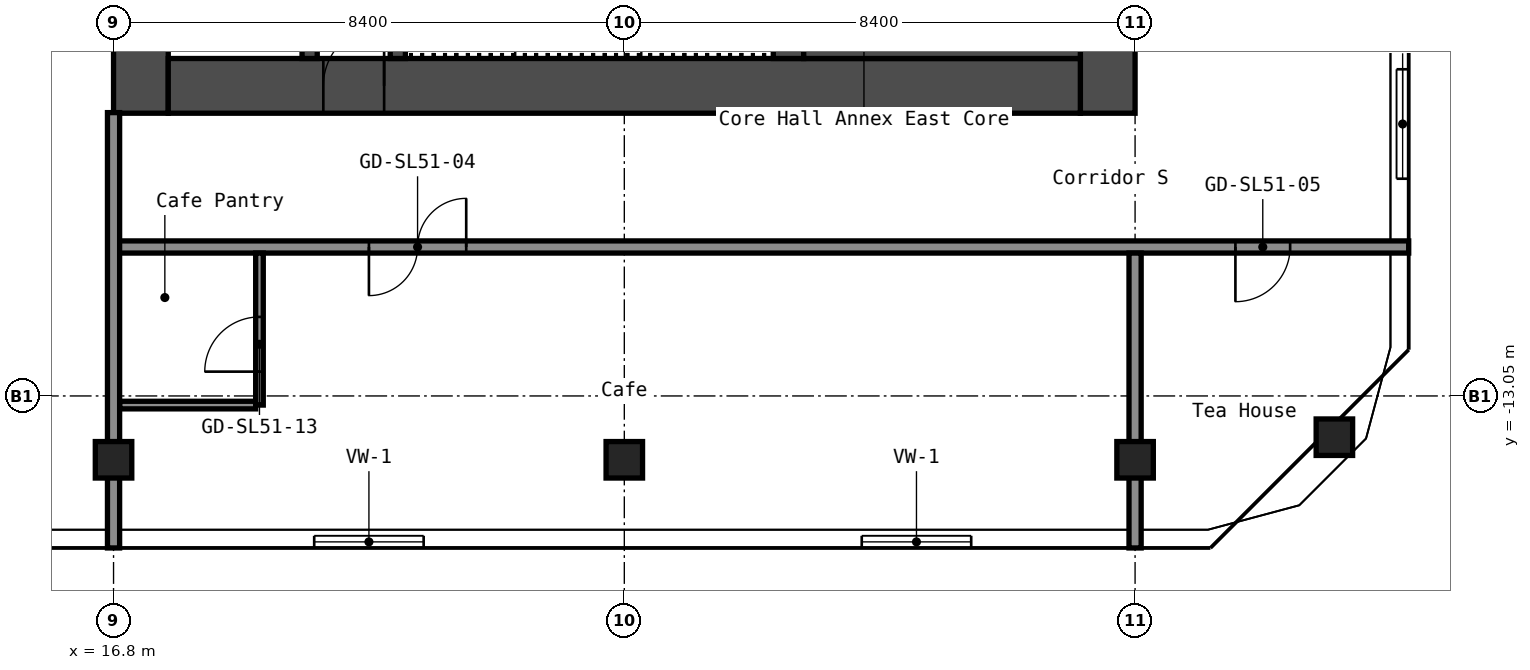
"""IFC4 building model, lengths in metres.
Left out: names, types, materials, properties, quantities, classifications, styles, units other than length and angle.
Written with IfcOpenShell. Run it as: python <this file> out.ifc"""

import sys

from ifc_helpers import new_model, si_unit, direction, frame, frame_2d, origin, origin_2d, place, context, subcontext, project, spatial, rectangle, hollow_rectangle, extrude, element, fill, save


model = new_model("IFC4")
c1 = context("Model", 3, precision=1e-05, world=origin(), true_north=direction((0.0, 1.0)))
c2 = subcontext(c1, "Body", "Model", "MODEL_VIEW")
j1 = project(units=[si_unit("LENGTHUNIT", "METRE"), si_unit("PLANEANGLEUNIT", "RADIAN")], contexts=[c1])
p1 = place(None, origin())
s1 = spatial("IfcSite", under=j1, at=p1, CompositionType="ELEMENT")
p2 = place(p1, origin())
s2 = spatial("IfcBuilding", under=s1, at=p2, CompositionType="ELEMENT")
p3 = place(p2, frame((0.0, 0.0, 180.2)))
s3 = spatial("IfcBuildingStorey", under=s2, at=p3, CompositionType="ELEMENT", Elevation=180.2)
for number, where, z_axis, x_axis in (
    (1, (16.8, -14.1, 0.0), (0.0, 0.0, 1.0), (1.0, 0.0, 0.0)),
    (2, (25.2, -14.1, 0.0), (0.0, 0.0, 1.0), (1.0, 0.0, 0.0)),
    (3, (33.6, -14.1, 0.0), (0.0, 0.0, 1.0), (1.0, 0.0, 0.0)),
    (4, (36.878, -13.729, 0.0), (0.0, 0.0, 1.0), (1.0, 0.0, 0.0)),
):
    element("IfcColumn", number, at=place(p3, frame(where, z_axis=z_axis, x_axis=x_axis)), inside=s3, PredefinedType="COLUMN", context=c2, shape_type="SweptSolid", body=[
        extrude(hollow_rectangle(XDim=0.6, YDim=0.6, WallThickness=0.025, InnerFilletRadius=0.038, OuterFilletRadius=0.062, at=origin_2d()), origin(), (0.0, 0.0, 1.0), 5.95),
    ])
p4 = place(p3, frame((17.25, -8.4, 0.0), z_axis=(0.0, 0.0, 1.0), x_axis=(0.0, 1.0, 0.0)))
e5 = element("IfcWall", 5, at=p4, inside=s3, PredefinedType="SHEAR", context=c2, shape_type="SweptSolid", body=[
    extrude(rectangle(XDim=16.8, YDim=0.9, at=frame_2d((8.4, 0.0))), origin(), (0.0, 0.0, 1.0), 5.95),
])
p5 = place(p4, frame((10.1, 0.0, 0.0)))
e6 = element("IfcOpeningElement", 6, at=p5, cuts=e5, PredefinedType="OPENING", context=c2, shape_type="SweptSolid", body=[
    extrude(rectangle(XDim=1.6, YDim=2.1, at=frame_2d((0.8, 1.05))), frame((0.0, 0.46, 0.0), z_axis=(0.0, -1.0, 0.0), x_axis=(1.0, 0.0, 0.0)), (0.0, 0.0, 1.0), 0.92),
])
p6 = place(p3, frame((33.15, -8.4, 0.0), z_axis=(0.0, 0.0, 1.0), x_axis=(0.0, 1.0, 0.0)))
e7 = element("IfcWall", 7, at=p6, inside=s3, PredefinedType="SHEAR", context=c2, shape_type="SweptSolid", body=[
    extrude(rectangle(XDim=16.8, YDim=0.9, at=frame_2d((8.4, 0.0))), origin(), (0.0, 0.0, 1.0), 5.95),
])
p7 = place(p3, frame((17.7, -7.95, 0.0), z_axis=(0.0, 0.0, 1.0), x_axis=(1.0, 0.0, 0.0)))
e8 = element("IfcWall", 8, at=p7, inside=s3, PredefinedType="SHEAR", context=c2, shape_type="SweptSolid", body=[
    extrude(rectangle(XDim=15.0, YDim=0.9, at=frame_2d((7.5, 0.0))), origin(), (0.0, 0.0, 1.0), 5.95),
])
p8 = place(p7, frame((2.55, 0.0, 0.0)))
e9 = element("IfcOpeningElement", 9, at=p8, cuts=e8, PredefinedType="OPENING", context=c2, shape_type="SweptSolid", body=[
    extrude(rectangle(XDim=1.0, YDim=2.1, at=frame_2d((0.5, 1.05))), frame((0.0, 0.46, 0.0), z_axis=(0.0, -1.0, 0.0), x_axis=(1.0, 0.0, 0.0)), (0.0, 0.0, 1.0), 0.92),
])
p9 = place(p3, frame((20.025, -7.5, 0.0), z_axis=(0.0, 0.0, 1.0), x_axis=(0.0, 1.0, 0.0)))
e10 = element("IfcWall", 10, at=p9, inside=s3, PredefinedType="SHEAR", context=c2, shape_type="SweptSolid", body=[
    extrude(rectangle(XDim=6.3, YDim=0.25, at=frame_2d((3.15, 0.0))), origin(), (0.0, 0.0, 1.0), 5.95),
])
p10 = place(p9, frame((2.4, 0.0, 0.0)))
e11 = element("IfcOpeningElement", 11, at=p10, cuts=e10, PredefinedType="OPENING", context=c2, shape_type="SweptSolid", body=[
    extrude(rectangle(XDim=1.0, YDim=2.1, at=frame_2d((0.5, 1.05))), frame((0.0, 0.135, 0.0), z_axis=(0.0, -1.0, 0.0), x_axis=(1.0, 0.0, 0.0)), (0.0, 0.0, 1.0), 0.27),
])
p11 = place(p3, frame((21.475, -7.5, 0.0), z_axis=(0.0, 0.0, 1.0), x_axis=(0.0, 1.0, 0.0)))
e12 = element("IfcWall", 12, at=p11, inside=s3, PredefinedType="SHEAR", context=c2, shape_type="SweptSolid", body=[
    extrude(rectangle(XDim=3.75, YDim=0.25, at=frame_2d((1.875, 0.0))), origin(), (0.0, 0.0, 1.0), 5.95),
])
p12 = place(p11, frame((1.3, 0.0, 0.0)))
e13 = element("IfcOpeningElement", 13, at=p12, cuts=e12, PredefinedType="OPENING", context=c2, shape_type="SweptSolid", body=[
    extrude(rectangle(XDim=1.2, YDim=2.1, at=frame_2d((0.6, 1.05))), frame((0.0, 0.135, 0.0), z_axis=(0.0, -1.0, 0.0), x_axis=(1.0, 0.0, 0.0)), (0.0, 0.0, 1.0), 0.27),
])
p13 = place(p3, frame((27.9, -7.5, 0.0), z_axis=(0.0, 0.0, 1.0), x_axis=(0.0, 1.0, 0.0)))
e14 = element("IfcWall", 14, at=p13, inside=s3, PredefinedType="SHEAR", context=c2, shape_type="SweptSolid", body=[
    extrude(rectangle(XDim=3.75, YDim=0.5, at=frame_2d((1.875, 0.0))), origin(), (0.0, 0.0, 1.0), 5.95),
])
p14 = place(p3, frame((28.15, -6.75, 0.0), z_axis=(0.0, 0.0, 1.0), x_axis=(1.0, 0.0, 0.0)))
e15 = element("IfcWall", 15, at=p14, inside=s3, PredefinedType="SHEAR", context=c2, shape_type="SweptSolid", body=[
    extrude(rectangle(XDim=4.55, YDim=1.5, at=frame_2d((2.275, 0.0))), origin(), (0.0, 0.0, 1.0), 5.95),
])
p15 = place(p3, frame((16.9, -13.2, 0.0), z_axis=(0.0, 0.0, 1.0), x_axis=(1.0, 0.0, 0.0)))
e16 = element("IfcWall", 16, at=p15, inside=s3, PredefinedType="PARTITIONING", context=c2, shape_type="SweptSolid", body=[
    extrude(rectangle(XDim=2.238, YDim=0.125, at=frame_2d((1.119, 0.0))), origin(), (0.0, 0.0, 1.0), 5.95),
])
p16 = place(p3, frame((16.8, -10.6, 0.0), z_axis=(0.0, 0.0, 1.0), x_axis=(1.0, 0.0, 0.0)))
e17 = element("IfcWall", 17, at=p16, inside=s3, PredefinedType="PARTITIONING", context=c2, shape_type="SweptSolid", body=[
    extrude(rectangle(XDim=21.3, YDim=0.2, at=frame_2d((10.65, 0.0))), origin(), (0.0, 0.0, 1.0), 5.95),
])
p17 = place(p16, frame((4.2, 0.0, 0.0)))
e18 = element("IfcOpeningElement", 18, at=p17, cuts=e17, PredefinedType="OPENING", context=c2, shape_type="SweptSolid", body=[
    extrude(rectangle(XDim=1.6, YDim=2.1, at=frame_2d((0.8, 1.05))), frame((0.0, 0.11, 0.0), z_axis=(0.0, -1.0, 0.0), x_axis=(1.0, 0.0, 0.0)), (0.0, 0.0, 1.0), 0.22),
])
p18 = place(p16, frame((18.45, 0.0, 0.0)))
e19 = element("IfcOpeningElement", 19, at=p18, cuts=e17, PredefinedType="OPENING", context=c2, shape_type="SweptSolid", body=[
    extrude(rectangle(XDim=0.9, YDim=2.1, at=frame_2d((0.45, 1.05))), frame((0.0, 0.11, 0.0), z_axis=(0.0, -1.0, 0.0), x_axis=(1.0, 0.0, 0.0)), (0.0, 0.0, 1.0), 0.22),
])
p19 = place(p3, frame((16.8, -15.55, 0.0), z_axis=(0.0, 0.0, 1.0), x_axis=(0.0, 1.0, 0.0)))
e20 = element("IfcWall", 20, at=p19, inside=s3, PredefinedType="PARTITIONING", context=c2, shape_type="SweptSolid", body=[
    extrude(rectangle(XDim=7.16, YDim=0.2, at=frame_2d((3.58, 0.0))), origin(), (0.0, 0.0, 1.0), 5.95),
])
p20 = place(p3, frame((19.2, -13.2, 0.0), z_axis=(0.0, 0.0, 1.0), x_axis=(0.0, 1.0, 0.0)))
e21 = element("IfcWall", 21, at=p20, inside=s3, PredefinedType="PARTITIONING", context=c2, shape_type="SweptSolid", body=[
    extrude(rectangle(XDim=2.5, YDim=0.125, at=frame_2d((1.25, 0.0))), origin(), (0.0, 0.0, 1.0), 5.95),
])
p21 = place(p20, frame((0.55, 0.0, 0.0)))
e22 = element("IfcOpeningElement", 22, at=p21, cuts=e21, PredefinedType="OPENING", context=c2, shape_type="SweptSolid", body=[
    extrude(rectangle(XDim=0.9, YDim=2.1, at=frame_2d((0.45, 1.05))), frame((0.0, 0.073, 0.0), z_axis=(0.0, -1.0, 0.0), x_axis=(1.0, 0.0, 0.0)), (0.0, 0.0, 1.0), 0.145),
])
p22 = place(p3, frame((33.6, -15.55, 0.0), z_axis=(0.0, 0.0, 1.0), x_axis=(0.0, 1.0, 0.0)))
e23 = element("IfcWall", 23, at=p22, inside=s3, PredefinedType="PARTITIONING", context=c2, shape_type="SweptSolid", body=[
    extrude(rectangle(XDim=4.85, YDim=0.2, at=frame_2d((2.425, 0.0))), origin(), (0.0, 0.0, 1.0), 5.95),
])
p23 = place(p3, frame((38.0, -12.26, 4.45), z_axis=(0.0, 0.0, 1.0), x_axis=(0.0, 1.0, 0.0)))
p24 = place(p23, frame((2.782, 0.0, 0.25)))
p25 = place(p24, origin())
e24 = element("IfcWindow", 24, at=p25, inside=s3, PartitioningType="SINGLE_PANEL", PredefinedType="WINDOW", context=c2, shape_type="SweptSolid", body=[
    extrude(rectangle(XDim=1.8, YDim=0.9, at=frame_2d((0.9, 0.45))), frame((0.0, 0.03, 0.0), z_axis=(0.0, -1.0, 0.0), x_axis=(1.0, 0.0, 0.0)), (0.0, 0.0, 1.0), 0.06),
])
p26 = place(p3, frame((16.8, -15.45, 4.45), z_axis=(0.0, 0.0, 1.0), x_axis=(1.0, 0.0, 0.0)))
p27 = place(p26, frame((3.3, 0.0, 0.25)))
p28 = place(p27, origin())
e25 = element("IfcWindow", 25, at=p28, inside=s3, PartitioningType="SINGLE_PANEL", PredefinedType="WINDOW", context=c2, shape_type="SweptSolid", body=[
    extrude(rectangle(XDim=1.8, YDim=0.9, at=frame_2d((0.9, 0.45))), frame((0.0, 0.03, 0.0), z_axis=(0.0, -1.0, 0.0), x_axis=(1.0, 0.0, 0.0)), (0.0, 0.0, 1.0), 0.06),
])
p29 = place(p3, frame((25.2, -15.45, 4.45), z_axis=(0.0, 0.0, 1.0), x_axis=(1.0, 0.0, 0.0)))
p30 = place(p29, frame((3.905, 0.0, 0.25)))
p31 = place(p30, origin())
e26 = element("IfcWindow", 26, at=p31, inside=s3, PartitioningType="SINGLE_PANEL", PredefinedType="WINDOW", context=c2, shape_type="SweptSolid", body=[
    extrude(rectangle(XDim=1.8, YDim=0.9, at=frame_2d((0.9, 0.45))), frame((0.0, 0.03, 0.0), z_axis=(0.0, -1.0, 0.0), x_axis=(1.0, 0.0, 0.0)), (0.0, 0.0, 1.0), 0.06),
])
p32 = place(p8, origin())
e27 = element("IfcDoor", 27, at=p32, inside=s3, OperationType="SINGLE_SWING_LEFT", PredefinedType="DOOR", context=c2, shape_type="SweptSolid", body=[
    extrude(rectangle(XDim=1.0, YDim=2.1, at=frame_2d((0.5, 1.05))), frame((0.0, 0.025, 0.0), z_axis=(0.0, -1.0, 0.0), x_axis=(1.0, 0.0, 0.0)), (0.0, 0.0, 1.0), 0.05),
])
fill(e9, e27)
p33 = place(p17, origin())
e28 = element("IfcDoor", 28, at=p33, inside=s3, OperationType="DOUBLE_DOOR_SINGLE_SWING", PredefinedType="DOOR", context=c2, shape_type="SweptSolid", body=[
    extrude(rectangle(XDim=1.6, YDim=2.1, at=frame_2d((0.8, 1.05))), frame((0.0, 0.025, 0.0), z_axis=(0.0, -1.0, 0.0), x_axis=(1.0, 0.0, 0.0)), (0.0, 0.0, 1.0), 0.05),
])
fill(e18, e28)
p34 = place(p18, origin())
e29 = element("IfcDoor", 29, at=p34, inside=s3, OperationType="SINGLE_SWING_LEFT", PredefinedType="DOOR", context=c2, shape_type="SweptSolid", body=[
    extrude(rectangle(XDim=0.9, YDim=2.1, at=frame_2d((0.45, 1.05))), frame((0.0, 0.025, 0.0), z_axis=(0.0, -1.0, 0.0), x_axis=(1.0, 0.0, 0.0)), (0.0, 0.0, 1.0), 0.05),
])
fill(e19, e29)
p35 = place(p21, origin())
e30 = element("IfcDoor", 30, at=p35, inside=s3, OperationType="SINGLE_SWING_RIGHT", PredefinedType="DOOR", context=c2, shape_type="SweptSolid", body=[
    extrude(rectangle(XDim=0.9, YDim=2.1, at=frame_2d((0.45, 1.05))), frame((0.0, 0.025, 0.0), z_axis=(0.0, -1.0, 0.0), x_axis=(1.0, 0.0, 0.0)), (0.0, 0.0, 1.0), 0.05),
])
fill(e22, e30)
save(model, sys.argv[1])
